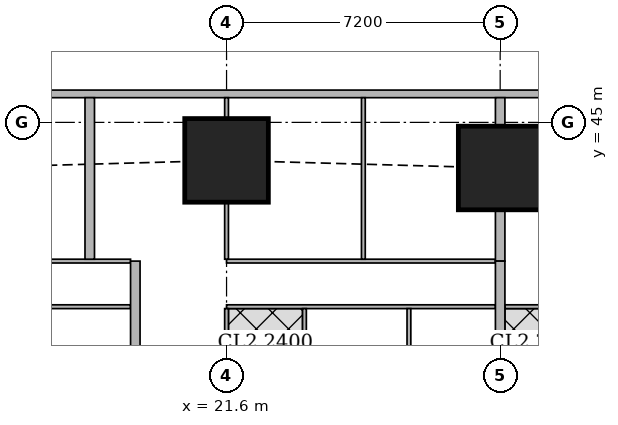
"""IFC4 building model, lengths in metres.
Left out: names, types, materials, properties, quantities, classifications, styles, units other than length and angle.
Written with IfcOpenShell. Run it as: python <this file> out.ifc"""

import sys

from ifc_helpers import new_model, si_unit, direction, frame, frame_2d, origin, origin_2d, place, context, subcontext, project, spatial, rectangle, extrude, element, fill, save


model = new_model("IFC4")
c1 = context("Model", 3, precision=1e-05, world=origin(), true_north=direction((0.0, 1.0)))
c2 = subcontext(c1, "Body", "Model", "MODEL_VIEW")
j1 = project(units=[si_unit("LENGTHUNIT", "METRE"), si_unit("PLANEANGLEUNIT", "RADIAN")], contexts=[c1])
p1 = place(None, origin())
s1 = spatial("IfcSite", under=j1, at=p1, CompositionType="ELEMENT")
p2 = place(p1, origin())
s2 = spatial("IfcBuilding", under=s1, at=p2, CompositionType="ELEMENT")
p3 = place(p2, frame((0.0, 0.0, 111.65)))
s3 = spatial("IfcBuildingStorey", under=s2, at=p3, CompositionType="ELEMENT", Elevation=111.65)
for number, where, z_axis, x_axis in (
    (1, (21.6, 44.0, 0.0), (0.0, 0.0, 1.0), (1.0, 0.0, 0.0)),
    (2, (28.8, 43.8, 0.0), (0.0, 0.0, 1.0), (1.0, 0.0, 0.0)),
):
    element("IfcColumn", number, at=place(p3, frame(where, z_axis=z_axis, x_axis=x_axis)), inside=s3, PredefinedType="COLUMN", context=c2, shape_type="SweptSolid", body=[
        extrude(rectangle(XDim=2.2, YDim=2.2, at=origin_2d()), origin(), (0.0, 0.0, 1.0), 3.75),
    ])
p4 = place(p3, frame((40.106, 45.75, 0.0), z_axis=(0.0, 0.0, 1.0), x_axis=(-1.0, 0.0, 0.0)))
e3 = element("IfcWall", 3, at=p4, inside=s3, PredefinedType="SOLIDWALL", context=c2, shape_type="SweptSolid", body=[
    extrude(rectangle(XDim=37.943, YDim=0.2, at=frame_2d((18.971, 0.0))), origin(), (0.0, 0.0, 1.0), 3.5),
])
p5 = place(p4, frame((8.606, 0.0, 0.9)))
e4 = element("IfcOpeningElement", 4, at=p5, cuts=e3, PredefinedType="OPENING", context=c2, shape_type="SweptSolid", body=[
    extrude(rectangle(XDim=1.8, YDim=1.5, at=frame_2d((0.9, 0.75))), frame((0.0, 0.11, 0.0), z_axis=(0.0, -1.0, 0.0), x_axis=(1.0, 0.0, 0.0)), (0.0, 0.0, 1.0), 0.22),
])
p6 = place(p4, frame((12.206, 0.0, 0.9)))
e5 = element("IfcOpeningElement", 5, at=p6, cuts=e3, PredefinedType="OPENING", context=c2, shape_type="SweptSolid", body=[
    extrude(rectangle(XDim=1.8, YDim=1.5, at=frame_2d((0.9, 0.75))), frame((0.0, 0.11, 0.0), z_axis=(0.0, -1.0, 0.0), x_axis=(1.0, 0.0, 0.0)), (0.0, 0.0, 1.0), 0.22),
])
p7 = place(p4, frame((15.806, 0.0, 0.9)))
e6 = element("IfcOpeningElement", 6, at=p7, cuts=e3, PredefinedType="OPENING", context=c2, shape_type="SweptSolid", body=[
    extrude(rectangle(XDim=1.8, YDim=1.5, at=frame_2d((0.9, 0.75))), frame((0.0, 0.11, 0.0), z_axis=(0.0, -1.0, 0.0), x_axis=(1.0, 0.0, 0.0)), (0.0, 0.0, 1.0), 0.22),
])
p8 = place(p4, frame((19.406, 0.0, 0.9)))
e7 = element("IfcOpeningElement", 7, at=p8, cuts=e3, PredefinedType="OPENING", context=c2, shape_type="SweptSolid", body=[
    extrude(rectangle(XDim=1.8, YDim=1.5, at=frame_2d((0.9, 0.75))), frame((0.0, 0.11, 0.0), z_axis=(0.0, -1.0, 0.0), x_axis=(1.0, 0.0, 0.0)), (0.0, 0.0, 1.0), 0.22),
])
p9 = place(p4, frame((23.006, 0.0, 0.9)))
e8 = element("IfcOpeningElement", 8, at=p9, cuts=e3, PredefinedType="OPENING", context=c2, shape_type="SweptSolid", body=[
    extrude(rectangle(XDim=1.8, YDim=1.5, at=frame_2d((0.9, 0.75))), frame((0.0, 0.11, 0.0), z_axis=(0.0, -1.0, 0.0), x_axis=(1.0, 0.0, 0.0)), (0.0, 0.0, 1.0), 0.22),
])
p10 = place(p4, frame((26.606, 0.0, 0.9)))
e9 = element("IfcOpeningElement", 9, at=p10, cuts=e3, PredefinedType="OPENING", context=c2, shape_type="SweptSolid", body=[
    extrude(rectangle(XDim=1.8, YDim=1.5, at=frame_2d((0.9, 0.75))), frame((0.0, 0.11, 0.0), z_axis=(0.0, -1.0, 0.0), x_axis=(1.0, 0.0, 0.0)), (0.0, 0.0, 1.0), 0.22),
])
p11 = place(p3, frame((14.4, 41.35, 0.0), z_axis=(0.0, 0.0, 1.0), x_axis=(1.0, 0.0, 0.0)))
e10 = element("IfcWall", 10, at=p11, inside=s3, PredefinedType="PARTITIONING", context=c2, shape_type="SweptSolid", body=[
    extrude(rectangle(XDim=4.674, YDim=0.1, at=frame_2d((2.337, 0.0))), origin(), (0.0, 0.0, 1.0), 3.5),
])
p12 = place(p11, frame((0.2, 0.0, 0.0)))
e11 = element("IfcOpeningElement", 11, at=p12, cuts=e10, PredefinedType="OPENING", context=c2, shape_type="SweptSolid", body=[
    extrude(rectangle(XDim=0.9, YDim=2.1, at=frame_2d((0.45, 1.05))), frame((0.0, 0.06, 0.0), z_axis=(0.0, -1.0, 0.0), x_axis=(1.0, 0.0, 0.0)), (0.0, 0.0, 1.0), 0.12),
])
p13 = place(p3, frame((14.4, 40.15, 0.0), z_axis=(0.0, 0.0, 1.0), x_axis=(1.0, 0.0, 0.0)))
e12 = element("IfcWall", 12, at=p13, inside=s3, PredefinedType="PARTITIONING", context=c2, shape_type="SweptSolid", body=[
    extrude(rectangle(XDim=4.674, YDim=0.1, at=frame_2d((2.337, 0.0))), origin(), (0.0, 0.0, 1.0), 3.5),
])
p14 = place(p13, frame((0.575, 0.0, 0.0)))
e13 = element("IfcOpeningElement", 13, at=p14, cuts=e12, PredefinedType="OPENING", context=c2, shape_type="SweptSolid", body=[
    extrude(rectangle(XDim=0.9, YDim=2.1, at=frame_2d((0.45, 1.05))), frame((0.0, 0.06, 0.0), z_axis=(0.0, -1.0, 0.0), x_axis=(1.0, 0.0, 0.0)), (0.0, 0.0, 1.0), 0.12),
])
p15 = place(p13, frame((2.975, 0.0, 0.0)))
e14 = element("IfcOpeningElement", 14, at=p15, cuts=e12, PredefinedType="OPENING", context=c2, shape_type="SweptSolid", body=[
    extrude(rectangle(XDim=0.9, YDim=2.1, at=frame_2d((0.45, 1.05))), frame((0.0, 0.06, 0.0), z_axis=(0.0, -1.0, 0.0), x_axis=(1.0, 0.0, 0.0)), (0.0, 0.0, 1.0), 0.12),
])
p16 = place(p3, frame((21.6, 41.35, 0.0), z_axis=(0.0, 0.0, 1.0), x_axis=(1.0, 0.0, 0.0)))
e15 = element("IfcWall", 15, at=p16, inside=s3, PredefinedType="PARTITIONING", context=c2, shape_type="SweptSolid", body=[
    extrude(rectangle(XDim=7.075, YDim=0.1, at=frame_2d((3.538, 0.0))), origin(), (0.0, 0.0, 1.0), 3.5),
])
p17 = place(p16, frame((0.2, 0.0, 0.0)))
e16 = element("IfcOpeningElement", 16, at=p17, cuts=e15, PredefinedType="OPENING", context=c2, shape_type="SweptSolid", body=[
    extrude(rectangle(XDim=0.9, YDim=2.1, at=frame_2d((0.45, 1.05))), frame((0.0, 0.06, 0.0), z_axis=(0.0, -1.0, 0.0), x_axis=(1.0, 0.0, 0.0)), (0.0, 0.0, 1.0), 0.12),
])
p18 = place(p16, frame((3.8, 0.0, 0.0)))
e17 = element("IfcOpeningElement", 17, at=p18, cuts=e15, PredefinedType="OPENING", context=c2, shape_type="SweptSolid", body=[
    extrude(rectangle(XDim=0.9, YDim=2.1, at=frame_2d((0.45, 1.05))), frame((0.0, 0.06, 0.0), z_axis=(0.0, -1.0, 0.0), x_axis=(1.0, 0.0, 0.0)), (0.0, 0.0, 1.0), 0.12),
])
p19 = place(p3, frame((21.6, 40.15, 0.0), z_axis=(0.0, 0.0, 1.0), x_axis=(1.0, 0.0, 0.0)))
e18 = element("IfcWall", 18, at=p19, inside=s3, PredefinedType="PARTITIONING", context=c2, shape_type="SweptSolid", body=[
    extrude(rectangle(XDim=7.075, YDim=0.1, at=frame_2d((3.538, 0.0))), origin(), (0.0, 0.0, 1.0), 3.5),
])
p20 = place(p19, frame((0.575, 0.0, 0.0)))
e19 = element("IfcOpeningElement", 19, at=p20, cuts=e18, PredefinedType="OPENING", context=c2, shape_type="SweptSolid", body=[
    extrude(rectangle(XDim=0.9, YDim=2.1, at=frame_2d((0.45, 1.05))), frame((0.0, 0.06, 0.0), z_axis=(0.0, -1.0, 0.0), x_axis=(1.0, 0.0, 0.0)), (0.0, 0.0, 1.0), 0.12),
])
p21 = place(p19, frame((5.549, 0.0, 0.0)))
e20 = element("IfcOpeningElement", 20, at=p21, cuts=e18, PredefinedType="OPENING", context=c2, shape_type="SweptSolid", body=[
    extrude(rectangle(XDim=0.9, YDim=2.1, at=frame_2d((0.45, 1.05))), frame((0.0, 0.06, 0.0), z_axis=(0.0, -1.0, 0.0), x_axis=(1.0, 0.0, 0.0)), (0.0, 0.0, 1.0), 0.12),
])
p22 = place(p19, frame((2.974, 0.0, 0.0)))
e21 = element("IfcOpeningElement", 21, at=p22, cuts=e18, PredefinedType="OPENING", context=c2, shape_type="SweptSolid", body=[
    extrude(rectangle(XDim=0.9, YDim=2.1, at=frame_2d((0.45, 1.05))), frame((0.0, 0.06, 0.0), z_axis=(0.0, -1.0, 0.0), x_axis=(1.0, 0.0, 0.0)), (0.0, 0.0, 1.0), 0.12),
])
p23 = place(p3, frame((21.6, 41.4, 0.0), z_axis=(0.0, 0.0, 1.0), x_axis=(0.0, 1.0, 0.0)))
e22 = element("IfcWall", 22, at=p23, inside=s3, PredefinedType="PARTITIONING", context=c2, shape_type="SweptSolid", body=[
    extrude(rectangle(XDim=1.499, YDim=0.1, at=frame_2d((0.75, 0.0))), origin(), (0.0, 0.0, 1.0), 3.5),
])
p24 = place(p3, frame((21.6, 45.101, 0.0), z_axis=(0.0, 0.0, 1.0), x_axis=(0.0, 1.0, 0.0)))
e23 = element("IfcWall", 23, at=p24, inside=s3, PredefinedType="PARTITIONING", context=c2, shape_type="SweptSolid", body=[
    extrude(rectangle(XDim=0.549, YDim=0.1, at=frame_2d((0.274, 0.0))), origin(), (0.0, 0.0, 1.0), 3.5),
])
p25 = place(p3, frame((25.2, 41.4, 0.0), z_axis=(0.0, 0.0, 1.0), x_axis=(0.0, 1.0, 0.0)))
e24 = element("IfcWall", 24, at=p25, inside=s3, PredefinedType="PARTITIONING", context=c2, shape_type="SweptSolid", body=[
    extrude(rectangle(XDim=4.25, YDim=0.1, at=frame_2d((2.125, 0.0))), origin(), (0.0, 0.0, 1.0), 2.2),
])
p26 = place(p3, frame((21.6, 38.301, 0.0), z_axis=(0.0, 0.0, 1.0), x_axis=(0.0, 1.0, 0.0)))
e25 = element("IfcWall", 25, at=p26, inside=s3, PredefinedType="PARTITIONING", context=c2, shape_type="SweptSolid", body=[
    extrude(rectangle(XDim=1.799, YDim=0.1, at=frame_2d((0.899, 0.0))), origin(), (0.0, 0.0, 1.0), 3.5),
])
for number, where, z_axis, x_axis in (
    (26, (26.399, 36.575, 0.0), (0.0, 0.0, 1.0), (0.0, 1.0, 0.0)),
    (27, (23.65, 36.575, 0.0), (0.0, 0.0, 1.0), (0.0, 1.0, 0.0)),
):
    element("IfcWall", number, at=place(p3, frame(where, z_axis=z_axis, x_axis=x_axis)), inside=s3, PredefinedType="PARTITIONING", context=c2, shape_type="SweptSolid", body=[
        extrude(rectangle(XDim=3.525, YDim=0.1, at=frame_2d((1.763, 0.0))), origin(), (0.0, 0.0, 1.0), 3.5),
    ])
p27 = place(p3, frame((18.0, 41.4, 0.0), z_axis=(0.0, 0.0, 1.0), x_axis=(0.0, 1.0, 0.0)))
e28 = element("IfcWall", 28, at=p27, inside=s3, PredefinedType="SOLIDWALL", context=c2, shape_type="SweptSolid", body=[
    extrude(rectangle(XDim=4.25, YDim=0.25, at=frame_2d((2.125, 0.0))), origin(), (0.0, 0.0, 1.0), 2.2),
])
p28 = place(p3, frame((19.199, 36.575, 0.0), z_axis=(0.0, 0.0, 1.0), x_axis=(0.0, 1.0, 0.0)))
e29 = element("IfcWall", 29, at=p28, inside=s3, PredefinedType="SOLIDWALL", context=c2, shape_type="SweptSolid", body=[
    extrude(rectangle(XDim=4.775, YDim=0.25, at=frame_2d((2.388, 0.0))), origin(), (0.0, 0.0, 1.0), 3.5),
])
p29 = place(p3, frame((28.925, 40.15, 0.0), z_axis=(0.0, 0.0, 1.0), x_axis=(1.0, 0.0, 0.0)))
e30 = element("IfcWall", 30, at=p29, inside=s3, PredefinedType="PARTITIONING", context=c2, shape_type="SweptSolid", body=[
    extrude(rectangle(XDim=1.765, YDim=0.1, at=frame_2d((0.882, 0.0))), origin(), (0.0, 0.0, 1.0), 3.5),
])
p30 = place(p29, frame((0.375, 0.0, 0.0)))
e31 = element("IfcOpeningElement", 31, at=p30, cuts=e30, PredefinedType="OPENING", context=c2, shape_type="SweptSolid", body=[
    extrude(rectangle(XDim=0.9, YDim=2.1, at=frame_2d((0.45, 1.05))), frame((0.0, 0.06, 0.0), z_axis=(0.0, -1.0, 0.0), x_axis=(1.0, 0.0, 0.0)), (0.0, 0.0, 1.0), 0.12),
])
p31 = place(p3, frame((28.8, 41.35, 0.0), z_axis=(0.0, 0.0, 1.0), x_axis=(0.0, 1.0, 0.0)))
e32 = element("IfcWall", 32, at=p31, inside=s3, PredefinedType="SOLIDWALL", context=c2, shape_type="SweptSolid", body=[
    extrude(rectangle(XDim=1.349, YDim=0.25, at=frame_2d((0.674, 0.0))), origin(), (0.0, 0.0, 1.0), 3.5),
])
p32 = place(p3, frame((28.8, 44.901, 0.0), z_axis=(0.0, 0.0, 1.0), x_axis=(0.0, 1.0, 0.0)))
e33 = element("IfcWall", 33, at=p32, inside=s3, PredefinedType="SOLIDWALL", context=c2, shape_type="SweptSolid", body=[
    extrude(rectangle(XDim=0.749, YDim=0.25, at=frame_2d((0.375, 0.0))), origin(), (0.0, 0.0, 1.0), 3.5),
])
p33 = place(p3, frame((28.8, 38.301, 0.0), z_axis=(0.0, 0.0, 1.0), x_axis=(0.0, 1.0, 0.0)))
e34 = element("IfcWall", 34, at=p33, inside=s3, PredefinedType="SOLIDWALL", context=c2, shape_type="SweptSolid", body=[
    extrude(rectangle(XDim=3.049, YDim=0.25, at=frame_2d((1.524, 0.0))), origin(), (0.0, 0.0, 1.0), 3.5),
])
p34 = place(p5, origin())
e35 = element("IfcWindow", 35, at=p34, inside=s3, PartitioningType="SINGLE_PANEL", PredefinedType="WINDOW", context=c2, shape_type="SweptSolid", body=[
    extrude(rectangle(XDim=1.8, YDim=1.5, at=frame_2d((0.9, 0.75))), frame((0.0, 0.03, 0.0), z_axis=(0.0, -1.0, 0.0), x_axis=(1.0, 0.0, 0.0)), (0.0, 0.0, 1.0), 0.06),
])
fill(e4, e35)
p35 = place(p6, origin())
e36 = element("IfcWindow", 36, at=p35, inside=s3, PartitioningType="SINGLE_PANEL", PredefinedType="WINDOW", context=c2, shape_type="SweptSolid", body=[
    extrude(rectangle(XDim=1.8, YDim=1.5, at=frame_2d((0.9, 0.75))), frame((0.0, 0.03, 0.0), z_axis=(0.0, -1.0, 0.0), x_axis=(1.0, 0.0, 0.0)), (0.0, 0.0, 1.0), 0.06),
])
fill(e5, e36)
p36 = place(p7, origin())
e37 = element("IfcWindow", 37, at=p36, inside=s3, PartitioningType="SINGLE_PANEL", PredefinedType="WINDOW", context=c2, shape_type="SweptSolid", body=[
    extrude(rectangle(XDim=1.8, YDim=1.5, at=frame_2d((0.9, 0.75))), frame((0.0, 0.03, 0.0), z_axis=(0.0, -1.0, 0.0), x_axis=(1.0, 0.0, 0.0)), (0.0, 0.0, 1.0), 0.06),
])
fill(e6, e37)
p37 = place(p8, origin())
e38 = element("IfcWindow", 38, at=p37, inside=s3, PartitioningType="SINGLE_PANEL", PredefinedType="WINDOW", context=c2, shape_type="SweptSolid", body=[
    extrude(rectangle(XDim=1.8, YDim=1.5, at=frame_2d((0.9, 0.75))), frame((0.0, 0.03, 0.0), z_axis=(0.0, -1.0, 0.0), x_axis=(1.0, 0.0, 0.0)), (0.0, 0.0, 1.0), 0.06),
])
fill(e7, e38)
p38 = place(p9, origin())
e39 = element("IfcWindow", 39, at=p38, inside=s3, PartitioningType="SINGLE_PANEL", PredefinedType="WINDOW", context=c2, shape_type="SweptSolid", body=[
    extrude(rectangle(XDim=1.8, YDim=1.5, at=frame_2d((0.9, 0.75))), frame((0.0, 0.03, 0.0), z_axis=(0.0, -1.0, 0.0), x_axis=(1.0, 0.0, 0.0)), (0.0, 0.0, 1.0), 0.06),
])
fill(e8, e39)
p39 = place(p15, origin())
e40 = element("IfcDoor", 40, at=p39, inside=s3, OperationType="SINGLE_SWING_LEFT", PredefinedType="DOOR", context=c2, shape_type="SweptSolid", body=[
    extrude(rectangle(XDim=0.9, YDim=2.1, at=frame_2d((0.45, 1.05))), frame((0.0, 0.025, 0.0), z_axis=(0.0, -1.0, 0.0), x_axis=(1.0, 0.0, 0.0)), (0.0, 0.0, 1.0), 0.05),
])
fill(e14, e40)
p40 = place(p17, origin())
e41 = element("IfcDoor", 41, at=p40, inside=s3, OperationType="SINGLE_SWING_LEFT", PredefinedType="DOOR", context=c2, shape_type="SweptSolid", body=[
    extrude(rectangle(XDim=0.9, YDim=2.1, at=frame_2d((0.45, 1.05))), frame((0.0, 0.025, 0.0), z_axis=(0.0, -1.0, 0.0), x_axis=(1.0, 0.0, 0.0)), (0.0, 0.0, 1.0), 0.05),
])
fill(e16, e41)
p41 = place(p18, origin())
e42 = element("IfcDoor", 42, at=p41, inside=s3, OperationType="SINGLE_SWING_LEFT", PredefinedType="DOOR", context=c2, shape_type="SweptSolid", body=[
    extrude(rectangle(XDim=0.9, YDim=2.1, at=frame_2d((0.45, 1.05))), frame((0.0, 0.025, 0.0), z_axis=(0.0, -1.0, 0.0), x_axis=(1.0, 0.0, 0.0)), (0.0, 0.0, 1.0), 0.05),
])
fill(e17, e42)
p42 = place(p20, origin())
e43 = element("IfcDoor", 43, at=p42, inside=s3, OperationType="SINGLE_SWING_RIGHT", PredefinedType="DOOR", context=c2, shape_type="SweptSolid", body=[
    extrude(rectangle(XDim=0.9, YDim=2.1, at=frame_2d((0.45, 1.05))), frame((0.0, 0.025, 0.0), z_axis=(0.0, -1.0, 0.0), x_axis=(1.0, 0.0, 0.0)), (0.0, 0.0, 1.0), 0.05),
])
fill(e19, e43)
p43 = place(p21, origin())
e44 = element("IfcDoor", 44, at=p43, inside=s3, OperationType="SINGLE_SWING_LEFT", PredefinedType="DOOR", context=c2, shape_type="SweptSolid", body=[
    extrude(rectangle(XDim=0.9, YDim=2.1, at=frame_2d((0.45, 1.05))), frame((0.0, 0.025, 0.0), z_axis=(0.0, -1.0, 0.0), x_axis=(1.0, 0.0, 0.0)), (0.0, 0.0, 1.0), 0.05),
])
fill(e20, e44)
p44 = place(p22, origin())
e45 = element("IfcDoor", 45, at=p44, inside=s3, OperationType="SINGLE_SWING_LEFT", PredefinedType="DOOR", context=c2, shape_type="SweptSolid", body=[
    extrude(rectangle(XDim=0.9, YDim=2.1, at=frame_2d((0.45, 1.05))), frame((0.0, 0.025, 0.0), z_axis=(0.0, -1.0, 0.0), x_axis=(1.0, 0.0, 0.0)), (0.0, 0.0, 1.0), 0.05),
])
fill(e21, e45)
p45 = place(p30, origin())
e46 = element("IfcDoor", 46, at=p45, inside=s3, OperationType="SINGLE_SWING_RIGHT", PredefinedType="DOOR", context=c2, shape_type="SweptSolid", body=[
    extrude(rectangle(XDim=0.9, YDim=2.1, at=frame_2d((0.45, 1.05))), frame((0.0, 0.025, 0.0), z_axis=(0.0, -1.0, 0.0), x_axis=(1.0, 0.0, 0.0)), (0.0, 0.0, 1.0), 0.05),
])
fill(e31, e46)
save(model, sys.argv[1])
